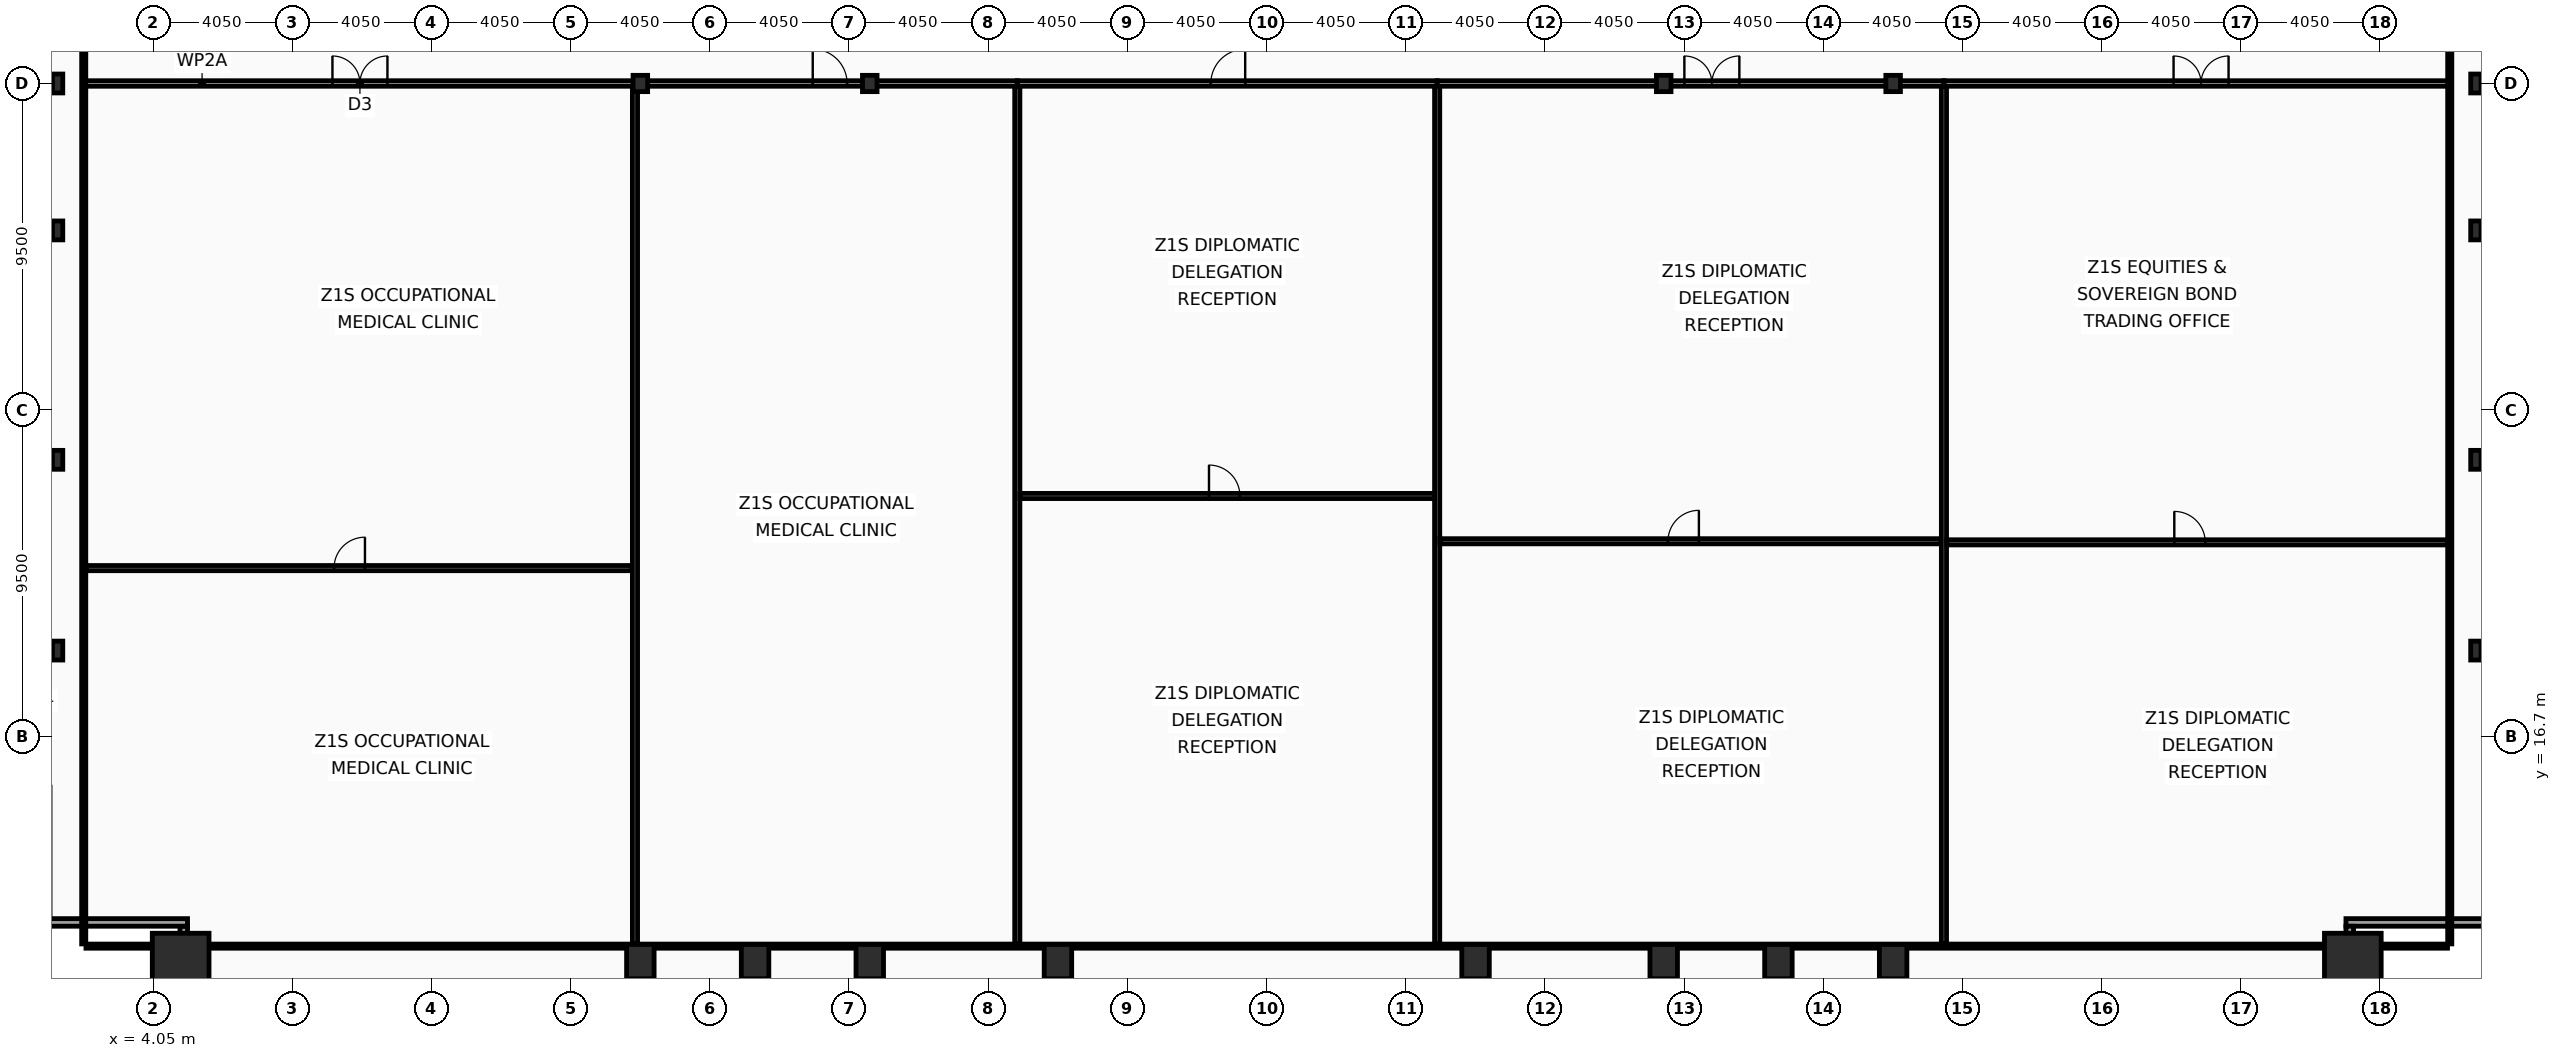
"""IFC4 building model, lengths in metres.
Left out: names, types, materials, properties, quantities, classifications, styles, units other than length and angle.
Written with IfcOpenShell. Run it as: python <this file> out.ifc"""

import sys

from ifc_helpers import new_model, si_unit, direction, frame, frame_2d, origin, origin_2d, place, context, subcontext, project, spatial, rectangle, hollow_rectangle, i_section, extrude, element, fill, save


model = new_model("IFC4")
c1 = context("Model", 3, precision=1e-05, world=origin(), true_north=direction((0.0, 1.0)))
c2 = subcontext(c1, "Body", "Model", "MODEL_VIEW")
j1 = project(units=[si_unit("LENGTHUNIT", "METRE"), si_unit("PLANEANGLEUNIT", "RADIAN")], contexts=[c1])
p1 = place(None, origin())
s1 = spatial("IfcSite", under=j1, at=p1, CompositionType="ELEMENT")
p2 = place(p1, origin())
s2 = spatial("IfcBuilding", under=s1, at=p2, CompositionType="ELEMENT")
p3 = place(p2, frame((0.0, 0.0, 69.8)))
s3 = spatial("IfcBuildingStorey", under=s2, at=p3, CompositionType="ELEMENT", Elevation=69.8)
for number, where, z_axis, x_axis in (
    (1, (4.85, 10.15, 0.0), (0.0, 0.0, 1.0), (1.0, 0.0, 0.0)),
    (2, (68.05, 10.15, 0.0), (0.0, 0.0, 1.0), (1.0, 0.0, 0.0)),
):
    element("IfcColumn", number, at=place(p3, frame(where, z_axis=z_axis, x_axis=x_axis)), inside=s3, PredefinedType="COLUMN", context=c2, shape_type="SweptSolid", body=[
        extrude(hollow_rectangle(XDim=1.65, YDim=1.65, WallThickness=0.075, at=origin_2d()), origin(), (0.0, 0.0, 1.0), 4.0),
    ])
for number, where, z_axis, x_axis in (
    (3, (18.225, 10.15, 0.0), (0.0, 0.0, 1.0), (1.0, 0.0, 0.0)),
    (4, (21.562, 10.15, 0.0), (0.0, 0.0, 1.0), (1.0, 0.0, 0.0)),
    (5, (24.9, 10.15, 0.0), (0.0, 0.0, 1.0), (1.0, 0.0, 0.0)),
    (6, (30.375, 10.15, 0.0), (0.0, 0.0, 1.0), (1.0, 0.0, 0.0)),
    (7, (42.525, 10.15, 0.0), (0.0, 0.0, 1.0), (1.0, 0.0, 0.0)),
    (8, (48.0, 10.15, 0.0), (0.0, 0.0, 1.0), (1.0, 0.0, 0.0)),
    (9, (51.337, 10.15, 0.0), (0.0, 0.0, 1.0), (1.0, 0.0, 0.0)),
    (10, (54.675, 10.15, 0.0), (0.0, 0.0, 1.0), (1.0, 0.0, 0.0)),
):
    element("IfcColumn", number, at=place(p3, frame(where, z_axis=z_axis, x_axis=x_axis)), inside=s3, PredefinedType="COLUMN", context=c2, shape_type="SweptSolid", body=[
        extrude(hollow_rectangle(XDim=0.8, YDim=1.0, WallThickness=0.055, at=origin_2d()), origin(), (0.0, 0.0, 1.0), 4.0),
    ])
for number, where, z_axis, x_axis in (
    (11, (1.27, 19.2, 0.0), (0.0, 0.0, 1.0), (1.0, 0.0, 0.0)),
    (12, (1.27, 24.75, 0.0), (0.0, 0.0, 1.0), (1.0, 0.0, 0.0)),
    (13, (1.27, 31.425, 0.0), (0.0, 0.0, 1.0), (1.0, 0.0, 0.0)),
    (14, (1.27, 35.7, 0.0), (0.0, 0.0, 1.0), (1.0, 0.0, 0.0)),
    (15, (71.63, 19.2, 0.0), (0.0, 0.0, 1.0), (1.0, 0.0, 0.0)),
    (16, (71.63, 24.75, 0.0), (0.0, 0.0, 1.0), (1.0, 0.0, 0.0)),
    (17, (71.63, 31.425, 0.0), (0.0, 0.0, 1.0), (1.0, 0.0, 0.0)),
    (18, (71.63, 35.7, 0.0), (0.0, 0.0, 1.0), (1.0, 0.0, 0.0)),
):
    element("IfcColumn", number, at=place(p3, frame(where, z_axis=z_axis, x_axis=x_axis)), inside=s3, PredefinedType="COLUMN", context=c2, shape_type="SweptSolid", body=[
        extrude(i_section(OverallWidth=0.3, OverallDepth=0.55, WebThickness=0.015, FlangeThickness=0.029, at=origin_2d()), origin(), (0.0, 0.0, 1.0), 4.0),
    ])
for number, where, z_axis, x_axis in (
    (19, (18.225, 35.7, 0.0), (0.0, 0.0, 1.0), (1.0, 0.0, 0.0)),
    (20, (24.9, 35.7, 0.0), (0.0, 0.0, 1.0), (1.0, 0.0, 0.0)),
    (21, (48.0, 35.7, 0.0), (0.0, 0.0, 1.0), (1.0, 0.0, 0.0)),
    (22, (54.675, 35.7, 0.0), (0.0, 0.0, 1.0), (1.0, 0.0, 0.0)),
):
    element("IfcColumn", number, at=place(p3, frame(where, z_axis=z_axis, x_axis=x_axis)), inside=s3, PredefinedType="COLUMN", context=c2, shape_type="SweptSolid", body=[
        extrude(i_section(OverallWidth=0.424, OverallDepth=0.474, WebThickness=0.048, FlangeThickness=0.077, at=origin_2d()), origin(), (0.0, 0.0, 1.0), 4.0),
    ])
p4 = place(p3, frame((4.94, 7.27, 0.0), z_axis=(0.0, 0.0, 1.0), x_axis=(0.0, 1.0, 0.0)))
e23 = element("IfcWall", 23, at=p4, inside=s3, PredefinedType="SOLIDWALL", context=c2, shape_type="SweptSolid", body=[
    extrude(rectangle(XDim=3.91, YDim=0.22, at=frame_2d((1.955, 0.0))), origin(), (0.0, 0.0, 1.0), 3.16),
])
for number, where, z_axis, x_axis in (
    (24, (5.05, 11.29, 0.0), (0.0, 0.0, 1.0), (-1.0, 0.0, 0.0)),
    (25, (72.07, 11.29, 0.0), (0.0, 0.0, 1.0), (-1.0, 0.0, 0.0)),
):
    element("IfcWall", number, at=place(p3, frame(where, z_axis=z_axis, x_axis=x_axis)), inside=s3, PredefinedType="SOLIDWALL", context=c2, shape_type="SweptSolid", body=[
        extrude(rectangle(XDim=4.22, YDim=0.22, at=frame_2d((2.11, 0.0))), origin(), (0.0, 0.0, 1.0), 3.16),
    ])
p5 = place(p3, frame((67.96, 11.18, 0.0), z_axis=(0.0, 0.0, 1.0), x_axis=(0.0, -1.0, 0.0)))
e26 = element("IfcWall", 26, at=p5, inside=s3, PredefinedType="SOLIDWALL", context=c2, shape_type="SweptSolid", body=[
    extrude(rectangle(XDim=3.91, YDim=0.22, at=frame_2d((1.955, 0.0))), origin(), (0.0, 0.0, 1.0), 3.16),
])
p6 = place(p3, frame((2.03, 35.7, 0.0), z_axis=(0.0, 0.0, 1.0), x_axis=(1.0, 0.0, 0.0)))
e27 = element("IfcWall", 27, at=p6, inside=s3, PredefinedType="PARTITIONING", context=c2, shape_type="SweptSolid", body=[
    extrude(rectangle(XDim=16.039, YDim=0.16, at=frame_2d((8.019, 0.0))), origin(), (0.0, 0.0, 1.0), 3.01),
])
p7 = place(p6, frame((7.236, 0.0, 0.0)))
e28 = element("IfcOpeningElement", 28, at=p7, cuts=e27, PredefinedType="OPENING", context=c2, shape_type="SweptSolid", body=[
    extrude(rectangle(XDim=1.6, YDim=2.15, at=frame_2d((0.8, 1.075))), frame((0.0, 0.09, 0.0), z_axis=(0.0, -1.0, 0.0), x_axis=(1.0, 0.0, 0.0)), (0.0, 0.0, 1.0), 0.18),
])
p8 = place(p3, frame((2.095, 21.599, 0.0), z_axis=(0.0, 0.0, 1.0), x_axis=(1.0, 0.0, 0.0)))
e29 = element("IfcWall", 29, at=p8, inside=s3, PredefinedType="PARTITIONING", context=c2, shape_type="SweptSolid", body=[
    extrude(rectangle(XDim=15.894, YDim=0.15, at=frame_2d((7.947, 0.0))), origin(), (0.0, 0.0, 1.0), 3.01),
])
p9 = place(p8, frame((7.217, 0.0, 0.0)))
e30 = element("IfcOpeningElement", 30, at=p9, cuts=e29, PredefinedType="OPENING", context=c2, shape_type="SweptSolid", body=[
    extrude(rectangle(XDim=0.9, YDim=2.05, at=frame_2d((0.45, 1.025))), frame((0.0, 0.085, 0.0), z_axis=(0.0, -1.0, 0.0), x_axis=(1.0, 0.0, 0.0)), (0.0, 0.0, 1.0), 0.17),
])
p10 = place(p3, frame((18.069, 35.7, 0.0), z_axis=(0.0, 0.0, 1.0), x_axis=(1.0, 0.0, 0.0)))
e31 = element("IfcWall", 31, at=p10, inside=s3, PredefinedType="PARTITIONING", context=c2, shape_type="SweptSolid", body=[
    extrude(rectangle(XDim=11.124, YDim=0.16, at=frame_2d((5.562, 0.0))), origin(), (0.0, 0.0, 1.0), 3.01),
])
p11 = place(p10, frame((5.172, 0.0, 0.0)))
e32 = element("IfcOpeningElement", 32, at=p11, cuts=e31, PredefinedType="OPENING", context=c2, shape_type="SweptSolid", body=[
    extrude(rectangle(XDim=1.0, YDim=2.05, at=frame_2d((0.5, 1.025))), frame((0.0, 0.09, 0.0), z_axis=(0.0, -1.0, 0.0), x_axis=(1.0, 0.0, 0.0)), (0.0, 0.0, 1.0), 0.18),
])
p12 = place(p3, frame((18.069, 10.665, 0.0), z_axis=(0.0, 0.0, 1.0), x_axis=(0.0, 1.0, 0.0)))
e33 = element("IfcWall", 33, at=p12, inside=s3, PredefinedType="PARTITIONING", context=c2, shape_type="SweptSolid", body=[
    extrude(rectangle(XDim=24.95, YDim=0.15, at=frame_2d((12.475, 0.0))), origin(), (0.0, 0.0, 1.0), 3.01),
])
p13 = place(p3, frame((29.192, 35.7, 0.0), z_axis=(0.0, 0.0, 1.0), x_axis=(1.0, 0.0, 0.0)))
e34 = element("IfcWall", 34, at=p13, inside=s3, PredefinedType="PARTITIONING", context=c2, shape_type="SweptSolid", body=[
    extrude(rectangle(XDim=12.216, YDim=0.16, at=frame_2d((6.108, 0.0))), origin(), (0.0, 0.0, 1.0), 3.01),
])
p14 = place(p13, frame((5.631, 0.0, 0.0)))
e35 = element("IfcOpeningElement", 35, at=p14, cuts=e34, PredefinedType="OPENING", context=c2, shape_type="SweptSolid", body=[
    extrude(rectangle(XDim=1.0, YDim=2.05, at=frame_2d((0.5, 1.025))), frame((0.0, 0.09, 0.0), z_axis=(0.0, -1.0, 0.0), x_axis=(1.0, 0.0, 0.0)), (0.0, 0.0, 1.0), 0.18),
])
p15 = place(p3, frame((29.192, 10.665, 0.0), z_axis=(0.0, 0.0, 1.0), x_axis=(0.0, 1.0, 0.0)))
e36 = element("IfcWall", 36, at=p15, inside=s3, PredefinedType="PARTITIONING", context=c2, shape_type="SweptSolid", body=[
    extrude(rectangle(XDim=24.95, YDim=0.15, at=frame_2d((12.475, 0.0))), origin(), (0.0, 0.0, 1.0), 3.26),
])
p16 = place(p3, frame((29.272, 23.698, 0.0), z_axis=(0.0, 0.0, 1.0), x_axis=(1.0, 0.0, 0.0)))
e37 = element("IfcWall", 37, at=p16, inside=s3, PredefinedType="PARTITIONING", context=c2, shape_type="SweptSolid", body=[
    extrude(rectangle(XDim=12.056, YDim=0.15, at=frame_2d((6.028, 0.0))), origin(), (0.0, 0.0, 1.0), 3.01),
])
p17 = place(p16, frame((5.497, 0.0, 0.0)))
e38 = element("IfcOpeningElement", 38, at=p17, cuts=e37, PredefinedType="OPENING", context=c2, shape_type="SweptSolid", body=[
    extrude(rectangle(XDim=0.9, YDim=2.05, at=frame_2d((0.45, 1.025))), frame((0.0, 0.085, 0.0), z_axis=(0.0, -1.0, 0.0), x_axis=(1.0, 0.0, 0.0)), (0.0, 0.0, 1.0), 0.17),
])
p18 = place(p3, frame((41.408, 35.7, 0.0), z_axis=(0.0, 0.0, 1.0), x_axis=(1.0, 0.0, 0.0)))
e39 = element("IfcWall", 39, at=p18, inside=s3, PredefinedType="PARTITIONING", context=c2, shape_type="SweptSolid", body=[
    extrude(rectangle(XDim=14.745, YDim=0.16, at=frame_2d((7.373, 0.0))), origin(), (0.0, 0.0, 1.0), 3.01),
])
p19 = place(p18, frame((7.193, 0.0, 0.0)))
e40 = element("IfcOpeningElement", 40, at=p19, cuts=e39, PredefinedType="OPENING", context=c2, shape_type="SweptSolid", body=[
    extrude(rectangle(XDim=1.6, YDim=2.15, at=frame_2d((0.8, 1.075))), frame((0.0, 0.09, 0.0), z_axis=(0.0, -1.0, 0.0), x_axis=(1.0, 0.0, 0.0)), (0.0, 0.0, 1.0), 0.18),
])
p20 = place(p3, frame((41.408, 10.665, 0.0), z_axis=(0.0, 0.0, 1.0), x_axis=(0.0, 1.0, 0.0)))
e41 = element("IfcWall", 41, at=p20, inside=s3, PredefinedType="PARTITIONING", context=c2, shape_type="SweptSolid", body=[
    extrude(rectangle(XDim=24.95, YDim=0.15, at=frame_2d((12.475, 0.0))), origin(), (0.0, 0.0, 1.0), 3.26),
])
p21 = place(p3, frame((41.488, 22.38, 0.0), z_axis=(0.0, 0.0, 1.0), x_axis=(1.0, 0.0, 0.0)))
e42 = element("IfcWall", 42, at=p21, inside=s3, PredefinedType="PARTITIONING", context=c2, shape_type="SweptSolid", body=[
    extrude(rectangle(XDim=14.585, YDim=0.15, at=frame_2d((7.292, 0.0))), origin(), (0.0, 0.0, 1.0), 3.01),
])
p22 = place(p21, frame((6.635, 0.0, 0.0)))
e43 = element("IfcOpeningElement", 43, at=p22, cuts=e42, PredefinedType="OPENING", context=c2, shape_type="SweptSolid", body=[
    extrude(rectangle(XDim=0.9, YDim=2.05, at=frame_2d((0.45, 1.025))), frame((0.0, 0.085, 0.0), z_axis=(0.0, -1.0, 0.0), x_axis=(1.0, 0.0, 0.0)), (0.0, 0.0, 1.0), 0.17),
])
p23 = place(p3, frame((56.154, 35.7, 0.0), z_axis=(0.0, 0.0, 1.0), x_axis=(1.0, 0.0, 0.0)))
e44 = element("IfcWall", 44, at=p23, inside=s3, PredefinedType="PARTITIONING", context=c2, shape_type="SweptSolid", body=[
    extrude(rectangle(XDim=14.717, YDim=0.16, at=frame_2d((7.358, 0.0))), origin(), (0.0, 0.0, 1.0), 3.01),
])
p24 = place(p23, frame((6.681, 0.0, 0.0)))
e45 = element("IfcOpeningElement", 45, at=p24, cuts=e44, PredefinedType="OPENING", context=c2, shape_type="SweptSolid", body=[
    extrude(rectangle(XDim=1.6, YDim=2.15, at=frame_2d((0.8, 1.075))), frame((0.0, 0.09, 0.0), z_axis=(0.0, -1.0, 0.0), x_axis=(1.0, 0.0, 0.0)), (0.0, 0.0, 1.0), 0.18),
])
p25 = place(p3, frame((56.154, 10.665, 0.0), z_axis=(0.0, 0.0, 1.0), x_axis=(0.0, 1.0, 0.0)))
e46 = element("IfcWall", 46, at=p25, inside=s3, PredefinedType="PARTITIONING", context=c2, shape_type="SweptSolid", body=[
    extrude(rectangle(XDim=24.95, YDim=0.15, at=frame_2d((12.475, 0.0))), origin(), (0.0, 0.0, 1.0), 3.01),
])
p26 = place(p3, frame((56.233, 22.349, 0.0), z_axis=(0.0, 0.0, 1.0), x_axis=(1.0, 0.0, 0.0)))
e47 = element("IfcWall", 47, at=p26, inside=s3, PredefinedType="PARTITIONING", context=c2, shape_type="SweptSolid", body=[
    extrude(rectangle(XDim=14.572, YDim=0.15, at=frame_2d((7.286, 0.0))), origin(), (0.0, 0.0, 1.0), 3.82),
])
p27 = place(p26, frame((6.622, 0.0, 0.0)))
e48 = element("IfcOpeningElement", 48, at=p27, cuts=e47, PredefinedType="OPENING", context=c2, shape_type="SweptSolid", body=[
    extrude(rectangle(XDim=0.9, YDim=2.05, at=frame_2d((0.45, 1.025))), frame((0.0, 0.085, 0.0), z_axis=(0.0, -1.0, 0.0), x_axis=(1.0, 0.0, 0.0)), (0.0, 0.0, 1.0), 0.17),
])
for number, where, z_axis, x_axis in (
    (49, (2.03, 10.665, 0.0), (0.0, 0.0, 1.0), (0.0, 1.0, 0.0)),
    (50, (70.87, 10.665, 0.0), (0.0, 0.0, 1.0), (0.0, 1.0, 0.0)),
):
    element("IfcWall", number, at=place(p3, frame(where, z_axis=z_axis, x_axis=x_axis)), inside=s3, PredefinedType="PARTITIONING", context=c2, shape_type="SweptSolid", body=[
        extrude(rectangle(XDim=42.11, YDim=0.12, at=frame_2d((21.055, 0.0))), origin(), (0.0, 0.0, 1.0), 3.01),
    ])
p28 = place(p3, frame((2.095, 10.6, 0.0), z_axis=(0.0, 0.0, 1.0), x_axis=(1.0, 0.0, 0.0)))
e51 = element("IfcWall", 51, at=p28, inside=s3, PredefinedType="PARTITIONING", context=c2, shape_type="SweptSolid", body=[
    extrude(rectangle(XDim=68.71, YDim=0.12, at=frame_2d((34.355, 0.0))), origin(), (0.0, 0.0, 1.0), 3.01),
])
p29 = place(p7, origin())
e52 = element("IfcDoor", 52, at=p29, inside=s3, OperationType="DOUBLE_DOOR_SINGLE_SWING", PredefinedType="DOOR", context=c2, shape_type="SweptSolid", body=[
    extrude(rectangle(XDim=1.6, YDim=2.15, at=frame_2d((0.8, 1.075))), frame((0.0, 0.025, 0.0), z_axis=(0.0, -1.0, 0.0), x_axis=(1.0, 0.0, 0.0)), (0.0, 0.0, 1.0), 0.05),
])
fill(e28, e52)
p30 = place(p9, origin())
e53 = element("IfcDoor", 53, at=p30, inside=s3, OperationType="SINGLE_SWING_RIGHT", PredefinedType="DOOR", context=c2, shape_type="SweptSolid", body=[
    extrude(rectangle(XDim=0.9, YDim=2.05, at=frame_2d((0.45, 1.025))), frame((0.0, 0.025, 0.0), z_axis=(0.0, -1.0, 0.0), x_axis=(1.0, 0.0, 0.0)), (0.0, 0.0, 1.0), 0.05),
])
fill(e30, e53)
p31 = place(p11, origin())
e54 = element("IfcDoor", 54, at=p31, inside=s3, OperationType="SINGLE_SWING_LEFT", PredefinedType="DOOR", context=c2, shape_type="SweptSolid", body=[
    extrude(rectangle(XDim=1.0, YDim=2.05, at=frame_2d((0.5, 1.025))), frame((0.0, 0.025, 0.0), z_axis=(0.0, -1.0, 0.0), x_axis=(1.0, 0.0, 0.0)), (0.0, 0.0, 1.0), 0.05),
])
fill(e32, e54)
p32 = place(p14, origin())
e55 = element("IfcDoor", 55, at=p32, inside=s3, OperationType="SINGLE_SWING_RIGHT", PredefinedType="DOOR", context=c2, shape_type="SweptSolid", body=[
    extrude(rectangle(XDim=1.0, YDim=2.05, at=frame_2d((0.5, 1.025))), frame((0.0, 0.025, 0.0), z_axis=(0.0, -1.0, 0.0), x_axis=(1.0, 0.0, 0.0)), (0.0, 0.0, 1.0), 0.05),
])
fill(e35, e55)
p33 = place(p17, origin())
e56 = element("IfcDoor", 56, at=p33, inside=s3, OperationType="SINGLE_SWING_LEFT", PredefinedType="DOOR", context=c2, shape_type="SweptSolid", body=[
    extrude(rectangle(XDim=0.9, YDim=2.05, at=frame_2d((0.45, 1.025))), frame((0.0, 0.025, 0.0), z_axis=(0.0, -1.0, 0.0), x_axis=(1.0, 0.0, 0.0)), (0.0, 0.0, 1.0), 0.05),
])
fill(e38, e56)
p34 = place(p19, origin())
e57 = element("IfcDoor", 57, at=p34, inside=s3, OperationType="DOUBLE_DOOR_SINGLE_SWING", PredefinedType="DOOR", context=c2, shape_type="SweptSolid", body=[
    extrude(rectangle(XDim=1.6, YDim=2.15, at=frame_2d((0.8, 1.075))), frame((0.0, 0.025, 0.0), z_axis=(0.0, -1.0, 0.0), x_axis=(1.0, 0.0, 0.0)), (0.0, 0.0, 1.0), 0.05),
])
fill(e40, e57)
p35 = place(p22, origin())
e58 = element("IfcDoor", 58, at=p35, inside=s3, OperationType="SINGLE_SWING_RIGHT", PredefinedType="DOOR", context=c2, shape_type="SweptSolid", body=[
    extrude(rectangle(XDim=0.9, YDim=2.05, at=frame_2d((0.45, 1.025))), frame((0.0, 0.025, 0.0), z_axis=(0.0, -1.0, 0.0), x_axis=(1.0, 0.0, 0.0)), (0.0, 0.0, 1.0), 0.05),
])
fill(e43, e58)
p36 = place(p24, origin())
e59 = element("IfcDoor", 59, at=p36, inside=s3, OperationType="DOUBLE_DOOR_SINGLE_SWING", PredefinedType="DOOR", context=c2, shape_type="SweptSolid", body=[
    extrude(rectangle(XDim=1.6, YDim=2.15, at=frame_2d((0.8, 1.075))), frame((0.0, 0.025, 0.0), z_axis=(0.0, -1.0, 0.0), x_axis=(1.0, 0.0, 0.0)), (0.0, 0.0, 1.0), 0.05),
])
fill(e45, e59)
p37 = place(p27, origin())
e60 = element("IfcDoor", 60, at=p37, inside=s3, OperationType="SINGLE_SWING_LEFT", PredefinedType="DOOR", context=c2, shape_type="SweptSolid", body=[
    extrude(rectangle(XDim=0.9, YDim=2.05, at=frame_2d((0.45, 1.025))), frame((0.0, 0.025, 0.0), z_axis=(0.0, -1.0, 0.0), x_axis=(1.0, 0.0, 0.0)), (0.0, 0.0, 1.0), 0.05),
])
fill(e48, e60)
save(model, sys.argv[1])
